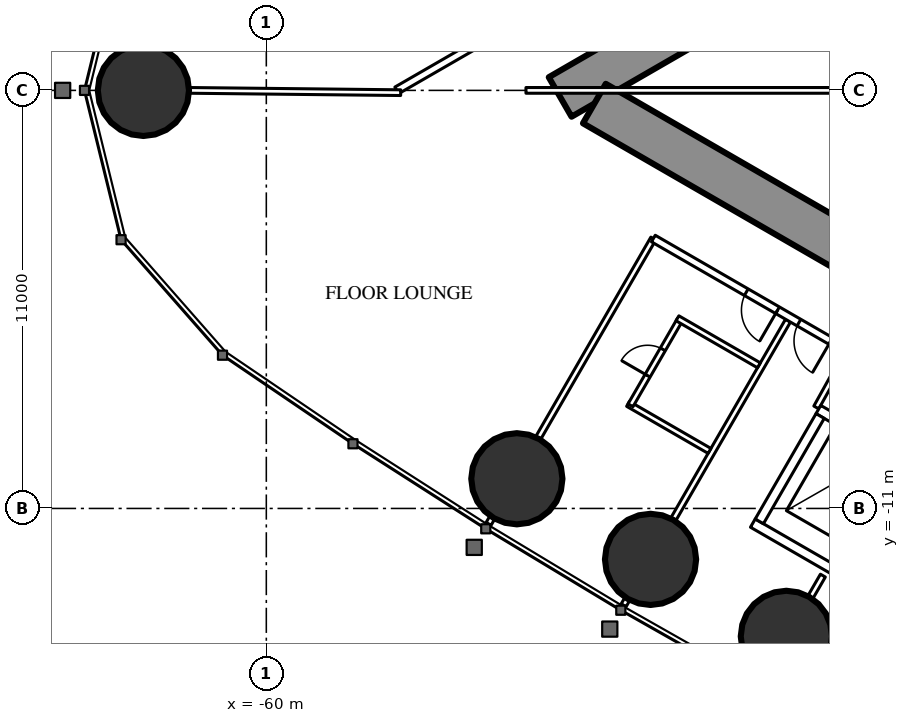
"""IFC4 building model, lengths in metres.
Left out: names, types, materials, properties, quantities, classifications, styles, units other than length and angle.
Written with IfcOpenShell. Run it as: python <this file> out.ifc"""

import sys

from ifc_helpers import new_model, si_unit, direction, frame, frame_2d, origin, origin_2d, place, context, subcontext, project, spatial, rectangle, circle, extrude, element, fill, save


model = new_model("IFC4")
c1 = context("Model", 3, precision=1e-05, world=origin(), true_north=direction((0.0, 1.0)))
c2 = subcontext(c1, "Body", "Model", "MODEL_VIEW")
j1 = project(units=[si_unit("LENGTHUNIT", "METRE"), si_unit("PLANEANGLEUNIT", "RADIAN")], contexts=[c1])
p1 = place(None, origin())
s1 = spatial("IfcSite", under=j1, at=p1, CompositionType="ELEMENT")
p2 = place(p1, origin())
s2 = spatial("IfcBuilding", under=s1, at=p2, CompositionType="ELEMENT")
p3 = place(p2, frame((0.0, 0.0, 240.5)))
s3 = spatial("IfcBuildingStorey", under=s2, at=p3, CompositionType="ELEMENT", Elevation=240.5)
for number, where, z_axis, x_axis in (
    (1, (-63.234, 0.0, 0.0), (0.0, 0.0, 1.0), (1.0, 0.0, 0.0)),
    (2, (-53.408, -10.219, 0.0), (0.0, 0.0, 1.0), (1.0, 0.0, 0.0)),
    (3, (-49.89, -12.34, 0.0), (0.0, 0.0, 1.0), (1.0, 0.0, 0.0)),
    (4, (-46.317, -14.365, 0.0), (0.0, 0.0, 1.0), (1.0, 0.0, 0.0)),
):
    element("IfcColumn", number, at=place(p3, frame(where, z_axis=z_axis, x_axis=x_axis)), inside=s3, PredefinedType="COLUMN", context=c2, shape_type="SweptSolid", body=[
        extrude(circle(Radius=1.2, at=origin_2d()), origin(), (0.0, 0.0, 1.0), 3.6),
    ])
p4 = place(p3, frame((-27.2, 14.3, 0.0), z_axis=(0.0, 0.0, 1.0), x_axis=(-0.866026593062, -0.499997940104, 0.0)))
e5 = element("IfcWall", 5, at=p4, inside=s3, PredefinedType="SHEAR", context=c2, shape_type="SweptSolid", body=[
    extrude(rectangle(XDim=28.946, YDim=1.2, at=frame_2d((14.473, 0.0))), origin(), (0.0, 0.0, 1.0), 3.6),
])
p5 = place(p4, frame((4.6, 0.0, 0.0)))
e6 = element("IfcOpeningElement", 6, at=p5, cuts=e5, PredefinedType="OPENING", context=c2, shape_type="SweptSolid", body=[
    extrude(rectangle(XDim=1.0, YDim=2.2, at=frame_2d((0.5, 1.1))), frame((0.0, 0.61, 0.0), z_axis=(0.0, -1.0, 0.0), x_axis=(1.0, 0.0, 0.0)), (0.0, 0.0, 1.0), 1.22),
])
p6 = place(p4, frame((13.395, 0.0, 0.0)))
e7 = element("IfcOpeningElement", 7, at=p6, cuts=e5, PredefinedType="OPENING", context=c2, shape_type="SweptSolid", body=[
    extrude(rectangle(XDim=1.8, YDim=2.2, at=frame_2d((0.9, 1.1))), frame((0.0, 0.61, 0.0), z_axis=(0.0, -1.0, 0.0), x_axis=(1.0, 0.0, 0.0)), (0.0, 0.0, 1.0), 1.22),
])
p7 = place(p3, frame((-27.2, -14.3, 0.0), z_axis=(0.0, 0.0, 1.0), x_axis=(-0.866024021859, 0.500002393557, 0.0)))
e8 = element("IfcWall", 8, at=p7, inside=s3, PredefinedType="SHEAR", context=c2, shape_type="SweptSolid", body=[
    extrude(rectangle(XDim=27.907, YDim=1.2, at=frame_2d((13.954, 0.0))), origin(), (0.0, 0.0, 1.0), 3.6),
])
p8 = place(p7, frame((4.6, 0.0, 0.0)))
e9 = element("IfcOpeningElement", 9, at=p8, cuts=e8, PredefinedType="OPENING", context=c2, shape_type="SweptSolid", body=[
    extrude(rectangle(XDim=1.0, YDim=2.2, at=frame_2d((0.5, 1.1))), frame((0.0, 0.61, 0.0), z_axis=(0.0, -1.0, 0.0), x_axis=(1.0, 0.0, 0.0)), (0.0, 0.0, 1.0), 1.22),
])
p9 = place(p7, frame((13.395, 0.0, 0.0)))
e10 = element("IfcOpeningElement", 10, at=p9, cuts=e8, PredefinedType="OPENING", context=c2, shape_type="SweptSolid", body=[
    extrude(rectangle(XDim=1.8, YDim=2.2, at=frame_2d((0.9, 1.1))), frame((0.0, 0.61, 0.0), z_axis=(0.0, -1.0, 0.0), x_axis=(1.0, 0.0, 0.0)), (0.0, 0.0, 1.0), 1.22),
])
p10 = place(p3, frame((-28.737, 16.068, 0.0), z_axis=(0.0, 0.0, 1.0), x_axis=(-0.866026057212, -0.499998868229, 0.0)))
e11 = element("IfcWall", 11, at=p10, inside=s3, PredefinedType="PARTITIONING", context=c2, shape_type="SweptSolid", body=[
    extrude(rectangle(XDim=32.137, YDim=0.2, at=frame_2d((16.068, 0.0))), origin(), (0.0, 0.0, 1.0), 3.35),
])
p11 = place(p10, frame((1.08, 0.0, 0.0)))
e12 = element("IfcOpeningElement", 12, at=p11, cuts=e11, PredefinedType="OPENING", context=c2, shape_type="SweptSolid", body=[
    extrude(rectangle(XDim=1.8, YDim=2.03, at=frame_2d((0.9, 1.015))), frame((0.0, 0.11, 0.0), z_axis=(0.0, -1.0, 0.0), x_axis=(1.0, 0.0, 0.0)), (0.0, 0.0, 1.0), 0.22),
])
p12 = place(p10, frame((6.86, 0.0, 0.0)))
e13 = element("IfcOpeningElement", 13, at=p12, cuts=e11, PredefinedType="OPENING", context=c2, shape_type="SweptSolid", body=[
    extrude(rectangle(XDim=1.0, YDim=2.2, at=frame_2d((0.5, 1.1))), frame((0.0, 0.11, 0.0), z_axis=(0.0, -1.0, 0.0), x_axis=(1.0, 0.0, 0.0)), (0.0, 0.0, 1.0), 0.22),
])
p13 = place(p10, frame((16.418, 0.0, 0.0)))
e14 = element("IfcOpeningElement", 14, at=p13, cuts=e11, PredefinedType="OPENING", context=c2, shape_type="SweptSolid", body=[
    extrude(rectangle(XDim=0.95, YDim=2.2, at=frame_2d((0.475, 1.1))), frame((0.0, 0.11, 0.0), z_axis=(0.0, -1.0, 0.0), x_axis=(1.0, 0.0, 0.0)), (0.0, 0.0, 1.0), 0.22),
])
p14 = place(p10, frame((20.567, 0.0, 0.0)))
e15 = element("IfcOpeningElement", 15, at=p14, cuts=e11, PredefinedType="OPENING", context=c2, shape_type="SweptSolid", body=[
    extrude(rectangle(XDim=0.95, YDim=2.2, at=frame_2d((0.475, 1.1))), frame((0.0, 0.11, 0.0), z_axis=(0.0, -1.0, 0.0), x_axis=(1.0, 0.0, 0.0)), (0.0, 0.0, 1.0), 0.22),
])
p15 = place(p10, frame((27.065, 0.0, 0.0)))
e16 = element("IfcOpeningElement", 16, at=p15, cuts=e11, PredefinedType="OPENING", context=c2, shape_type="SweptSolid", body=[
    extrude(rectangle(XDim=0.95, YDim=2.2, at=frame_2d((0.475, 1.1))), frame((0.0, 0.11, 0.0), z_axis=(0.0, -1.0, 0.0), x_axis=(1.0, 0.0, 0.0)), (0.0, 0.0, 1.0), 0.22),
])
p16 = place(p3, frame((-46.274, -6.059, 0.0), z_axis=(0.0, 0.0, 1.0), x_axis=(-0.500020471368, -0.866013584312, 0.0)))
e17 = element("IfcWall", 17, at=p16, inside=s3, PredefinedType="PARTITIONING", context=c2, shape_type="SweptSolid", body=[
    extrude(rectangle(XDim=6.028, YDim=0.15, at=frame_2d((3.014, 0.0))), origin(), (0.0, 0.0, 1.0), 2.45),
])
p17 = place(p3, frame((-50.508, -13.392, 0.0), z_axis=(0.0, 0.0, 1.0), x_axis=(-0.499644091975, -0.866230789891, 0.0)))
e18 = element("IfcWall", 18, at=p17, inside=s3, PredefinedType="PARTITIONING", context=c2, shape_type="SweptSolid", body=[
    extrude(rectangle(XDim=0.18, YDim=0.15, at=frame_2d((0.09, 0.0))), origin(), (0.0, 0.0, 1.0), 2.45),
])
p18 = place(p3, frame((-49.816, -3.898, 0.0), z_axis=(0.0, 0.0, 1.0), x_axis=(-0.500001913541, -0.866024298998, 0.0)))
e19 = element("IfcWall", 19, at=p18, inside=s3, PredefinedType="PARTITIONING", context=c2, shape_type="SweptSolid", body=[
    extrude(rectangle(XDim=6.05, YDim=0.15, at=frame_2d((3.025, 0.0))), origin(), (0.0, 0.0, 1.0), 2.45),
])
p19 = place(p3, frame((-54.061, -11.25, 0.0), z_axis=(0.0, 0.0, 1.0), x_axis=(-0.500391173478, -0.865799441849, 0.0)))
e20 = element("IfcWall", 20, at=p19, inside=s3, PredefinedType="PARTITIONING", context=c2, shape_type="SweptSolid", body=[
    extrude(rectangle(XDim=0.179, YDim=0.15, at=frame_2d((0.089, 0.0))), origin(), (0.0, 0.0, 1.0), 2.45),
])
p20 = place(p3, frame((-56.464, -0.06, 0.0), z_axis=(0.0, 0.0, 1.0), x_axis=(-0.999941455167, 0.01082063951, 0.0)))
e21 = element("IfcWall", 21, at=p20, inside=s3, PredefinedType="PARTITIONING", context=c2, shape_type="SweptSolid", body=[
    extrude(rectangle(XDim=5.55, YDim=0.15, at=frame_2d((2.775, 0.0))), origin(), (0.0, 0.0, 1.0), 2.45),
])
p21 = place(p3, frame((-45.356, -12.767, 0.0), z_axis=(0.0, 0.0, 1.0), x_axis=(-0.499886366516, -0.866091000168, 0.0)))
e22 = element("IfcWall", 22, at=p21, inside=s3, PredefinedType="PARTITIONING", context=c2, shape_type="SweptSolid", body=[
    extrude(rectangle(XDim=0.645, YDim=0.15, at=frame_2d((0.322, 0.0))), origin(), (0.0, 0.0, 1.0), 3.35),
])
p22 = place(p3, frame((-44.652, -6.764, 0.0), z_axis=(0.0, 0.0, 1.0), x_axis=(-0.485424724123, -0.874278466629, 0.0)))
e23 = element("IfcWall", 23, at=p22, inside=s3, PredefinedType="PARTITIONING", context=c2, shape_type="SweptSolid", body=[
    extrude(rectangle(XDim=1.805, YDim=0.15, at=frame_2d((0.903, 0.0))), origin(), (0.0, 0.0, 1.0), 3.35),
])
p23 = place(p3, frame((-48.339, -9.486, 0.0), z_axis=(0.0, 0.0, 1.0), x_axis=(-0.866006523861, 0.500032699561, 0.0)))
e24 = element("IfcWall", 24, at=p23, inside=s3, PredefinedType="PARTITIONING", context=c2, shape_type="SweptSolid", body=[
    extrude(rectangle(XDim=2.475, YDim=0.15, at=frame_2d((1.237, 0.0))), origin(), (0.0, 0.0, 1.0), 3.35),
])
p24 = place(p3, frame((-49.117, -6.034, 0.0), z_axis=(0.0, 0.0, 1.0), x_axis=(-0.500006934395, -0.866021400173, 0.0)))
e25 = element("IfcWall", 25, at=p24, inside=s3, PredefinedType="PARTITIONING", context=c2, shape_type="SweptSolid", body=[
    extrude(rectangle(XDim=2.6, YDim=0.15, at=frame_2d((1.3, 0.0))), origin(), (0.0, 0.0, 1.0), 3.35),
])
p25 = place(p24, frame((0.9, 0.0, 0.0)))
e26 = element("IfcOpeningElement", 26, at=p25, cuts=e25, PredefinedType="OPENING", context=c2, shape_type="SweptSolid", body=[
    extrude(rectangle(XDim=0.8, YDim=2.2, at=frame_2d((0.4, 1.1))), frame((0.0, 0.085, 0.0), z_axis=(0.0, -1.0, 0.0), x_axis=(1.0, 0.0, 0.0)), (0.0, 0.0, 1.0), 0.17),
])
p26 = place(p3, frame((-47.039, -7.234, 0.0), z_axis=(0.0, 0.0, 1.0), x_axis=(-0.866073894602, 0.499916002032, 0.0)))
e27 = element("IfcWall", 27, at=p26, inside=s3, PredefinedType="PARTITIONING", context=c2, shape_type="SweptSolid", body=[
    extrude(rectangle(XDim=2.475, YDim=0.15, at=frame_2d((1.238, 0.0))), origin(), (0.0, 0.0, 1.0), 2.5),
])
p27 = place(p3, frame((-44.715, -6.844, 0.0), z_axis=(0.0, 0.0, 1.0), x_axis=(-0.866020627653, 0.50000827241, 0.0)))
e28 = element("IfcWall", 28, at=p27, inside=s3, PredefinedType="PARTITIONING", context=c2, shape_type="SweptSolid", body=[
    extrude(rectangle(XDim=5.891, YDim=0.2, at=frame_2d((2.945, 0.0))), origin(), (0.0, 0.0, 1.0), 3.35),
])
p28 = place(p27, frame((2.117, 0.0, 0.0)))
e29 = element("IfcOpeningElement", 29, at=p28, cuts=e28, PredefinedType="OPENING", context=c2, shape_type="SweptSolid", body=[
    extrude(rectangle(XDim=0.95, YDim=2.2, at=frame_2d((0.475, 1.1))), frame((0.0, 0.11, 0.0), z_axis=(0.0, -1.0, 0.0), x_axis=(1.0, 0.0, 0.0)), (0.0, 0.0, 1.0), 0.22),
])
p29 = place(p27, frame((0.5, 0.0, 0.0)))
e30 = element("IfcOpeningElement", 30, at=p29, cuts=e28, PredefinedType="OPENING", context=c2, shape_type="SweptSolid", body=[
    extrude(rectangle(XDim=0.967, YDim=2.2, at=frame_2d((0.483, 1.1))), frame((0.0, 0.11, 0.0), z_axis=(0.0, -1.0, 0.0), x_axis=(1.0, 0.0, 0.0)), (0.0, 0.0, 1.0), 0.22),
])
p30 = place(p3, frame((-43.075, 0.0, 0.0), z_axis=(0.0, 0.0, 1.0), x_axis=(-1.0, 0.0, 0.0)))
e31 = element("IfcWall", 31, at=p30, inside=s3, PredefinedType="PARTITIONING", context=c2, shape_type="SweptSolid", body=[
    extrude(rectangle(XDim=10.093, YDim=0.15, at=frame_2d((5.047, 0.0))), origin(), (0.0, 0.0, 1.0), 2.45),
])
p31 = place(p3, frame((-39.758, -11.697, 0.0), z_axis=(0.0, 0.0, 1.0), x_axis=(-0.866024194504, 0.500002094529, 0.0)))
e32 = element("IfcWall", 32, at=p31, inside=s3, PredefinedType="PARTITIONING", context=c2, shape_type="SweptSolid", body=[
    extrude(rectangle(XDim=6.6, YDim=0.25, at=frame_2d((3.3, 0.0))), origin(), (0.0, 0.0, 1.0), 3.35),
])
p32 = place(p31, frame((0.75, 0.0, 0.0)))
e33 = element("IfcOpeningElement", 33, at=p32, cuts=e32, PredefinedType="OPENING", context=c2, shape_type="SweptSolid", body=[
    extrude(rectangle(XDim=1.1, YDim=2.2, at=frame_2d((0.55, 1.1))), frame((0.0, 0.135, 0.0), z_axis=(0.0, -1.0, 0.0), x_axis=(1.0, 0.0, 0.0)), (0.0, 0.0, 1.0), 0.27),
])
p33 = place(p31, frame((2.75, 0.0, 0.0)))
e34 = element("IfcOpeningElement", 34, at=p33, cuts=e32, PredefinedType="OPENING", context=c2, shape_type="SweptSolid", body=[
    extrude(rectangle(XDim=1.1, YDim=2.2, at=frame_2d((0.55, 1.1))), frame((0.0, 0.135, 0.0), z_axis=(0.0, -1.0, 0.0), x_axis=(1.0, 0.0, 0.0)), (0.0, 0.0, 1.0), 0.27),
])
p34 = place(p31, frame((4.75, 0.0, 0.0)))
e35 = element("IfcOpeningElement", 35, at=p34, cuts=e32, PredefinedType="OPENING", context=c2, shape_type="SweptSolid", body=[
    extrude(rectangle(XDim=1.1, YDim=2.2, at=frame_2d((0.55, 1.1))), frame((0.0, 0.135, 0.0), z_axis=(0.0, -1.0, 0.0), x_axis=(1.0, 0.0, 0.0)), (0.0, 0.0, 1.0), 0.27),
])
p35 = place(p3, frame((-41.482, -14.686, 0.0), z_axis=(0.0, 0.0, 1.0), x_axis=(-0.86603344179, 0.499986077507, 0.0)))
e36 = element("IfcWall", 36, at=p35, inside=s3, PredefinedType="PARTITIONING", context=c2, shape_type="SweptSolid", body=[
    extrude(rectangle(XDim=6.6, YDim=0.25, at=frame_2d((3.3, 0.0))), origin(), (0.0, 0.0, 1.0), 3.35),
])
p36 = place(p3, frame((-45.428, -8.568, 0.0), z_axis=(0.0, 0.0, 1.0), x_axis=(-0.499929347863, -0.866066190972, 0.0)))
e37 = element("IfcWall", 37, at=p36, inside=s3, PredefinedType="PARTITIONING", context=c2, shape_type="SweptSolid", body=[
    extrude(rectangle(XDim=3.201, YDim=0.25, at=frame_2d((1.6, 0.0))), origin(), (0.0, 0.0, 1.0), 3.35),
])
p37 = place(p25, origin())
e38 = element("IfcDoor", 38, at=p37, inside=s3, OperationType="SINGLE_SWING_RIGHT", PredefinedType="DOOR", context=c2, shape_type="SweptSolid", body=[
    extrude(rectangle(XDim=0.8, YDim=2.2, at=frame_2d((0.4, 1.1))), frame((0.0, 0.025, 0.0), z_axis=(0.0, -1.0, 0.0), x_axis=(1.0, 0.0, 0.0)), (0.0, 0.0, 1.0), 0.05),
])
fill(e26, e38)
p38 = place(p28, origin())
e39 = element("IfcDoor", 39, at=p38, inside=s3, OperationType="SINGLE_SWING_LEFT", PredefinedType="DOOR", context=c2, shape_type="SweptSolid", body=[
    extrude(rectangle(XDim=0.95, YDim=2.2, at=frame_2d((0.475, 1.1))), frame((0.0, 0.025, 0.0), z_axis=(0.0, -1.0, 0.0), x_axis=(1.0, 0.0, 0.0)), (0.0, 0.0, 1.0), 0.05),
])
fill(e29, e39)
p39 = place(p29, origin())
e40 = element("IfcDoor", 40, at=p39, inside=s3, OperationType="SINGLE_SWING_LEFT", PredefinedType="DOOR", context=c2, shape_type="SweptSolid", body=[
    extrude(rectangle(XDim=0.967, YDim=2.2, at=frame_2d((0.483, 1.1))), frame((0.0, 0.025, 0.0), z_axis=(0.0, -1.0, 0.0), x_axis=(1.0, 0.0, 0.0)), (0.0, 0.0, 1.0), 0.05),
])
fill(e30, e40)
save(model, sys.argv[1])
